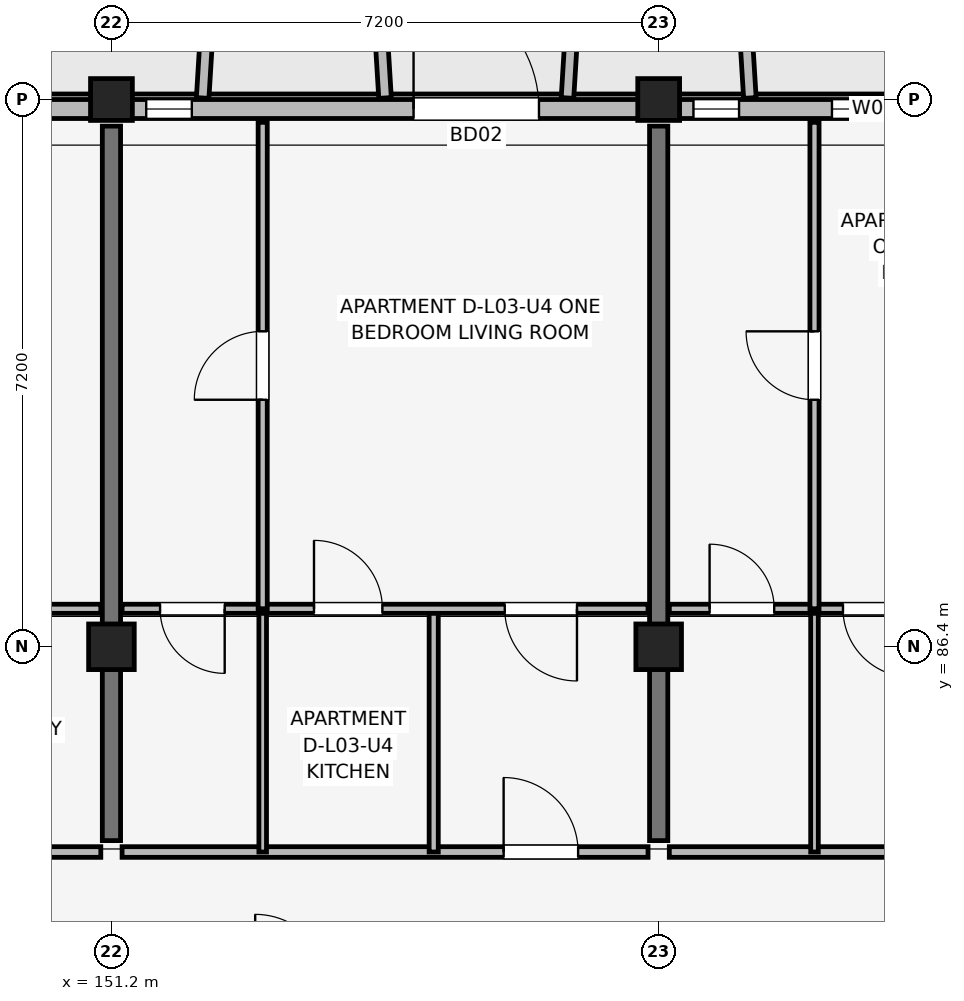
"""IFC4 building model, lengths in metres.
Left out: names, types, materials, properties, quantities, classifications, styles, units other than length and angle.
Written with IfcOpenShell. Run it as: python <this file> out.ifc"""

import sys

from ifc_helpers import new_model, si_unit, direction, frame, frame_2d, origin, origin_2d, place, context, subcontext, project, spatial, rectangle, extrude, element, fill, save


model = new_model("IFC4")
c1 = context("Model", 3, precision=1e-05, world=origin(), true_north=direction((0.0, 1.0)))
c2 = subcontext(c1, "Body", "Model", "MODEL_VIEW")
j1 = project(units=[si_unit("LENGTHUNIT", "METRE"), si_unit("PLANEANGLEUNIT", "RADIAN")], contexts=[c1])
p1 = place(None, origin())
s1 = spatial("IfcSite", under=j1, at=p1, CompositionType="ELEMENT")
p2 = place(p1, origin())
s2 = spatial("IfcBuilding", under=s1, at=p2, CompositionType="ELEMENT")
p3 = place(p2, frame((0.0, 0.0, 11.85)))
s3 = spatial("IfcBuildingStorey", under=s2, at=p3, CompositionType="ELEMENT", Elevation=11.85)
p4 = place(p3, frame((151.2, 86.4, 0.0), z_axis=(0.0, 0.0, 1.0), x_axis=(1.0, 0.0, 0.0)))
e1 = element("IfcColumn", 1, at=p4, inside=s3, PredefinedType="COLUMN", context=c2, shape_type="SweptSolid", body=[
    extrude(rectangle(XDim=0.6, YDim=0.6, at=origin_2d()), origin(), (0.0, 0.0, 1.0), 3.15),
])
p5 = place(p3, frame((151.2, 93.6, 0.0), z_axis=(0.0, 0.0, 1.0), x_axis=(1.0, 0.0, 0.0)))
e2 = element("IfcColumn", 2, at=p5, inside=s3, PredefinedType="COLUMN", context=c2, shape_type="SweptSolid", body=[
    extrude(rectangle(XDim=0.55, YDim=0.55, at=origin_2d()), origin(), (0.0, 0.0, 1.0), 3.15),
])
p6 = place(p3, frame((158.4, 86.4, 0.0), z_axis=(0.0, 0.0, 1.0), x_axis=(1.0, 0.0, 0.0)))
e3 = element("IfcColumn", 3, at=p6, inside=s3, PredefinedType="COLUMN", context=c2, shape_type="SweptSolid", body=[
    extrude(rectangle(XDim=0.6, YDim=0.6, at=origin_2d()), origin(), (0.0, 0.0, 1.0), 3.15),
])
p7 = place(p3, frame((158.4, 93.6, 0.0), z_axis=(0.0, 0.0, 1.0), x_axis=(1.0, 0.0, 0.0)))
e4 = element("IfcColumn", 4, at=p7, inside=s3, PredefinedType="COLUMN", context=c2, shape_type="SweptSolid", body=[
    extrude(rectangle(XDim=0.55, YDim=0.55, at=origin_2d()), origin(), (0.0, 0.0, 1.0), 3.15),
])
for number, where, z_axis, x_axis in (
    (5, (151.2, 83.85, 0.0), (0.0, 0.0, 1.0), (0.0, 1.0, 0.0)),
    (6, (158.4, 83.85, 0.0), (0.0, 0.0, 1.0), (0.0, 1.0, 0.0)),
):
    element("IfcWall", number, at=place(p3, frame(where, z_axis=z_axis, x_axis=x_axis)), inside=s3, PredefinedType="SHEAR", context=c2, shape_type="SweptSolid", body=[
        extrude(rectangle(XDim=9.4, YDim=0.24, at=frame_2d((4.7, 0.0))), origin(), (0.0, 0.0, 1.0), 3.15),
    ])
p8 = place(p3, frame((162.8, 93.475, 0.0), z_axis=(0.0, 0.0, 1.0), x_axis=(-1.0, 0.0, 0.0)))
e7 = element("IfcWall", 7, at=p8, inside=s3, PredefinedType="SOLIDWALL", context=c2, shape_type="SweptSolid", body=[
    extrude(rectangle(XDim=30.4, YDim=0.25, at=frame_2d((15.2, 0.0))), origin(), (0.0, 0.0, 1.0), 2.43),
])
p9 = place(p8, frame((22.1, 0.0, 0.0), z_axis=(0.0, 0.0, 1.0), x_axis=(-1.0, 0.0, 0.0)))
e8 = element("IfcOpeningElement", 8, at=p9, cuts=e7, PredefinedType="OPENING", context=c2, shape_type="SweptSolid", body=[
    extrude(rectangle(XDim=1.8, YDim=2.15, at=frame_2d((0.9, 1.075))), frame((0.0, 0.135, 0.0), z_axis=(0.0, -1.0, 0.0), x_axis=(1.0, 0.0, 0.0)), (0.0, 0.0, 1.0), 0.27),
])
p10 = place(p8, frame((7.625, 0.0, 0.0), z_axis=(0.0, 0.0, 1.0), x_axis=(-1.0, 0.0, 0.0)))
e9 = element("IfcOpeningElement", 9, at=p10, cuts=e7, PredefinedType="OPENING", context=c2, shape_type="SweptSolid", body=[
    extrude(rectangle(XDim=1.65, YDim=2.15, at=frame_2d((0.825, 1.075))), frame((0.0, 0.135, 0.0), z_axis=(0.0, -1.0, 0.0), x_axis=(1.0, 0.0, 0.0)), (0.0, 0.0, 1.0), 0.27),
])
p11 = place(p8, frame((27.97, 0.0, 0.7)))
e10 = element("IfcOpeningElement", 10, at=p11, cuts=e7, PredefinedType="OPENING", context=c2, shape_type="SweptSolid", body=[
    extrude(rectangle(XDim=1.46, YDim=1.55, at=frame_2d((0.73, 0.775))), frame((0.0, 0.135, 0.0), z_axis=(0.0, -1.0, 0.0), x_axis=(1.0, 0.0, 0.0)), (0.0, 0.0, 1.0), 0.27),
])
p12 = place(p8, frame((26.458, 0.0, 0.75)))
e11 = element("IfcOpeningElement", 11, at=p12, cuts=e7, PredefinedType="OPENING", context=c2, shape_type="SweptSolid", body=[
    extrude(rectangle(XDim=0.6, YDim=1.25, at=frame_2d((0.3, 0.625))), frame((0.0, 0.135, 0.0), z_axis=(0.0, -1.0, 0.0), x_axis=(1.0, 0.0, 0.0)), (0.0, 0.0, 1.0), 0.27),
])
p13 = place(p8, frame((24.942, 0.0, 0.75)))
e12 = element("IfcOpeningElement", 12, at=p13, cuts=e7, PredefinedType="OPENING", context=c2, shape_type="SweptSolid", body=[
    extrude(rectangle(XDim=0.6, YDim=1.25, at=frame_2d((0.3, 0.625))), frame((0.0, 0.135, 0.0), z_axis=(0.0, -1.0, 0.0), x_axis=(1.0, 0.0, 0.0)), (0.0, 0.0, 1.0), 0.27),
])
p14 = place(p8, frame((15.54, 0.0, 0.7)))
e13 = element("IfcOpeningElement", 13, at=p14, cuts=e7, PredefinedType="OPENING", context=c2, shape_type="SweptSolid", body=[
    extrude(rectangle(XDim=1.72, YDim=1.6, at=frame_2d((0.86, 0.8))), frame((0.0, 0.135, 0.0), z_axis=(0.0, -1.0, 0.0), x_axis=(1.0, 0.0, 0.0)), (0.0, 0.0, 1.0), 0.27),
])
p15 = place(p8, frame((13.465, 0.0, 0.75)))
e14 = element("IfcOpeningElement", 14, at=p15, cuts=e7, PredefinedType="OPENING", context=c2, shape_type="SweptSolid", body=[
    extrude(rectangle(XDim=0.72, YDim=1.35, at=frame_2d((0.36, 0.675))), frame((0.0, 0.135, 0.0), z_axis=(0.0, -1.0, 0.0), x_axis=(1.0, 0.0, 0.0)), (0.0, 0.0, 1.0), 0.27),
])
p16 = place(p8, frame((10.542, 0.0, 0.75)))
e15 = element("IfcOpeningElement", 15, at=p16, cuts=e7, PredefinedType="OPENING", context=c2, shape_type="SweptSolid", body=[
    extrude(rectangle(XDim=0.6, YDim=1.25, at=frame_2d((0.3, 0.625))), frame((0.0, 0.135, 0.0), z_axis=(0.0, -1.0, 0.0), x_axis=(1.0, 0.0, 0.0)), (0.0, 0.0, 1.0), 0.27),
])
p17 = place(p8, frame((3.343, 0.0, 0.75)))
e16 = element("IfcOpeningElement", 16, at=p17, cuts=e7, PredefinedType="OPENING", context=c2, shape_type="SweptSolid", body=[
    extrude(rectangle(XDim=0.6, YDim=1.25, at=frame_2d((0.3, 0.625))), frame((0.0, 0.135, 0.0), z_axis=(0.0, -1.0, 0.0), x_axis=(1.0, 0.0, 0.0)), (0.0, 0.0, 1.0), 0.27),
])
p18 = place(p8, frame((1.02, 0.0, 0.75)))
e17 = element("IfcOpeningElement", 17, at=p18, cuts=e7, PredefinedType="OPENING", context=c2, shape_type="SweptSolid", body=[
    extrude(rectangle(XDim=1.1, YDim=1.5, at=frame_2d((0.55, 0.75))), frame((0.0, 0.135, 0.0), z_axis=(0.0, -1.0, 0.0), x_axis=(1.0, 0.0, 0.0)), (0.0, 0.0, 1.0), 0.27),
])
for number, where, z_axis, x_axis in (
    (18, (152.4, 93.62, 0.0), (0.0, 0.0, 1.0), (0.061, 0.998, 0.0)),
    (19, (154.8, 93.62, 0.0), (0.0, 0.0, 1.0), (-0.061, 0.998, 0.0)),
    (20, (157.2, 93.62, 0.0), (0.0, 0.0, 1.0), (0.061, 0.998, 0.0)),
):
    element("IfcWall", number, at=place(p3, frame(where, z_axis=z_axis, x_axis=x_axis)), inside=s3, PredefinedType="ELEMENTEDWALL", context=c2, shape_type="SweptSolid", body=[
        extrude(rectangle(XDim=1.964, YDim=0.165, at=frame_2d((0.982, 0.0))), origin(), (0.0, 0.0, 1.0), 2.58),
    ])
p19 = place(p3, frame((159.6, 93.62, 0.0), z_axis=(0.0, 0.0, 1.0), x_axis=(-0.061170732449, 0.998127317276, 0.0)))
e21 = element("IfcWall", 21, at=p19, inside=s3, PredefinedType="ELEMENTEDWALL", context=c2, shape_type="SweptSolid", body=[
    extrude(rectangle(XDim=1.964, YDim=0.165, at=frame_2d((0.982, 0.0))), origin(), (0.0, 0.0, 1.0), 2.95),
])
p20 = place(p3, frame((144.14, 83.7, 0.0), z_axis=(0.0, 0.0, 1.0), x_axis=(1.0, 0.0, 0.0)))
e22 = element("IfcWall", 22, at=p20, inside=s3, PredefinedType="PARTITIONING", context=c2, shape_type="SweptSolid", body=[
    extrude(rectangle(XDim=6.92, YDim=0.14, at=frame_2d((3.46, 0.0))), origin(), (0.0, 0.0, 1.0), 2.38),
])
p21 = place(p20, frame((5.85, 0.0, 0.0), z_axis=(0.0, 0.0, 1.0), x_axis=(-1.0, 0.0, 0.0)))
e23 = element("IfcOpeningElement", 23, at=p21, cuts=e22, PredefinedType="OPENING", context=c2, shape_type="SweptSolid", body=[
    extrude(rectangle(XDim=0.98, YDim=2.1, at=frame_2d((0.49, 1.05))), frame((0.0, 0.08, 0.0), z_axis=(0.0, -1.0, 0.0), x_axis=(1.0, 0.0, 0.0)), (0.0, 0.0, 1.0), 0.16),
])
p22 = place(p3, frame((144.14, 86.9, 0.0), z_axis=(0.0, 0.0, 1.0), x_axis=(1.0, 0.0, 0.0)))
e24 = element("IfcWall", 24, at=p22, inside=s3, PredefinedType="PARTITIONING", context=c2, shape_type="SweptSolid", body=[
    extrude(rectangle(XDim=6.92, YDim=0.12, at=frame_2d((3.46, 0.0))), origin(), (0.0, 0.0, 1.0), 2.38),
])
p23 = place(p22, frame((0.5, 0.0, 0.0)))
e25 = element("IfcOpeningElement", 25, at=p23, cuts=e24, PredefinedType="OPENING", context=c2, shape_type="SweptSolid", body=[
    extrude(rectangle(XDim=0.85, YDim=2.08, at=frame_2d((0.425, 1.04))), frame((0.0, 0.07, 0.0), z_axis=(0.0, -1.0, 0.0), x_axis=(1.0, 0.0, 0.0)), (0.0, 0.0, 1.0), 0.14),
])
p24 = place(p22, frame((3.275, 0.0, 0.0), z_axis=(0.0, 0.0, 1.0), x_axis=(-1.0, 0.0, 0.0)))
e26 = element("IfcOpeningElement", 26, at=p24, cuts=e24, PredefinedType="OPENING", context=c2, shape_type="SweptSolid", body=[
    extrude(rectangle(XDim=0.9, YDim=2.08, at=frame_2d((0.45, 1.04))), frame((0.0, 0.07, 0.0), z_axis=(0.0, -1.0, 0.0), x_axis=(1.0, 0.0, 0.0)), (0.0, 0.0, 1.0), 0.14),
])
p25 = place(p22, frame((4.885, 0.0, 0.0)))
e27 = element("IfcOpeningElement", 27, at=p25, cuts=e24, PredefinedType="OPENING", context=c2, shape_type="SweptSolid", body=[
    extrude(rectangle(XDim=0.95, YDim=2.08, at=frame_2d((0.475, 1.04))), frame((0.0, 0.07, 0.0), z_axis=(0.0, -1.0, 0.0), x_axis=(1.0, 0.0, 0.0)), (0.0, 0.0, 1.0), 0.14),
])
p26 = place(p3, frame((151.34, 83.7, 0.0), z_axis=(0.0, 0.0, 1.0), x_axis=(1.0, 0.0, 0.0)))
e28 = element("IfcWall", 28, at=p26, inside=s3, PredefinedType="PARTITIONING", context=c2, shape_type="SweptSolid", body=[
    extrude(rectangle(XDim=6.92, YDim=0.14, at=frame_2d((3.46, 0.0))), origin(), (0.0, 0.0, 1.0), 2.38),
])
p27 = place(p26, frame((5.02, 0.0, 0.0)))
e29 = element("IfcOpeningElement", 29, at=p27, cuts=e28, PredefinedType="OPENING", context=c2, shape_type="SweptSolid", body=[
    extrude(rectangle(XDim=0.98, YDim=2.1, at=frame_2d((0.49, 1.05))), frame((0.0, 0.08, 0.0), z_axis=(0.0, -1.0, 0.0), x_axis=(1.0, 0.0, 0.0)), (0.0, 0.0, 1.0), 0.16),
])
p28 = place(p3, frame((153.19, 83.7, 0.0), z_axis=(0.0, 0.0, 1.0), x_axis=(0.0, 1.0, 0.0)))
e30 = element("IfcWall", 30, at=p28, inside=s3, PredefinedType="PARTITIONING", context=c2, shape_type="SweptSolid", body=[
    extrude(rectangle(XDim=3.2, YDim=0.1, at=frame_2d((1.6, 0.0))), origin(), (0.0, 0.0, 1.0), 2.375),
])
p29 = place(p3, frame((155.44, 83.7, 0.0), z_axis=(0.0, 0.0, 1.0), x_axis=(0.0, 1.0, 0.0)))
e31 = element("IfcWall", 31, at=p29, inside=s3, PredefinedType="PARTITIONING", context=c2, shape_type="SweptSolid", body=[
    extrude(rectangle(XDim=3.2, YDim=0.12, at=frame_2d((1.6, 0.0))), origin(), (0.0, 0.0, 1.0), 2.375),
])
p30 = place(p3, frame((151.34, 86.9, 0.0), z_axis=(0.0, 0.0, 1.0), x_axis=(1.0, 0.0, 0.0)))
e32 = element("IfcWall", 32, at=p30, inside=s3, PredefinedType="PARTITIONING", context=c2, shape_type="SweptSolid", body=[
    extrude(rectangle(XDim=6.92, YDim=0.12, at=frame_2d((3.46, 0.0))), origin(), (0.0, 0.0, 1.0), 2.38),
])
p31 = place(p30, frame((1.35, 0.0, 0.0), z_axis=(0.0, 0.0, 1.0), x_axis=(-1.0, 0.0, 0.0)))
e33 = element("IfcOpeningElement", 33, at=p31, cuts=e32, PredefinedType="OPENING", context=c2, shape_type="SweptSolid", body=[
    extrude(rectangle(XDim=0.85, YDim=2.08, at=frame_2d((0.425, 1.04))), frame((0.0, 0.07, 0.0), z_axis=(0.0, -1.0, 0.0), x_axis=(1.0, 0.0, 0.0)), (0.0, 0.0, 1.0), 0.14),
])
p32 = place(p30, frame((2.525, 0.0, 0.0)))
e34 = element("IfcOpeningElement", 34, at=p32, cuts=e32, PredefinedType="OPENING", context=c2, shape_type="SweptSolid", body=[
    extrude(rectangle(XDim=0.9, YDim=2.08, at=frame_2d((0.45, 1.04))), frame((0.0, 0.07, 0.0), z_axis=(0.0, -1.0, 0.0), x_axis=(1.0, 0.0, 0.0)), (0.0, 0.0, 1.0), 0.14),
])
p33 = place(p30, frame((5.985, 0.0, 0.0), z_axis=(0.0, 0.0, 1.0), x_axis=(-1.0, 0.0, 0.0)))
e35 = element("IfcOpeningElement", 35, at=p33, cuts=e32, PredefinedType="OPENING", context=c2, shape_type="SweptSolid", body=[
    extrude(rectangle(XDim=0.95, YDim=2.08, at=frame_2d((0.475, 1.04))), frame((0.0, 0.07, 0.0), z_axis=(0.0, -1.0, 0.0), x_axis=(1.0, 0.0, 0.0)), (0.0, 0.0, 1.0), 0.14),
])
p34 = place(p3, frame((153.19, 86.9, 0.0), z_axis=(0.0, 0.0, 1.0), x_axis=(0.0, 1.0, 0.0)))
e36 = element("IfcWall", 36, at=p34, inside=s3, PredefinedType="PARTITIONING", context=c2, shape_type="SweptSolid", body=[
    extrude(rectangle(XDim=6.4, YDim=0.12, at=frame_2d((3.2, 0.0))), origin(), (0.0, 0.0, 1.0), 2.38),
])
p35 = place(p34, frame((2.75, 0.0, 0.0)))
e37 = element("IfcOpeningElement", 37, at=p35, cuts=e36, PredefinedType="OPENING", context=c2, shape_type="SweptSolid", body=[
    extrude(rectangle(XDim=0.9, YDim=2.08, at=frame_2d((0.45, 1.04))), frame((0.0, 0.07, 0.0), z_axis=(0.0, -1.0, 0.0), x_axis=(1.0, 0.0, 0.0)), (0.0, 0.0, 1.0), 0.14),
])
p36 = place(p3, frame((158.54, 83.7, 0.0), z_axis=(0.0, 0.0, 1.0), x_axis=(1.0, 0.0, 0.0)))
e38 = element("IfcWall", 38, at=p36, inside=s3, PredefinedType="PARTITIONING", context=c2, shape_type="SweptSolid", body=[
    extrude(rectangle(XDim=6.92, YDim=0.14, at=frame_2d((3.46, 0.0))), origin(), (0.0, 0.0, 1.0), 2.38),
])
p37 = place(p36, frame((4.875, 0.0, 0.0), z_axis=(0.0, 0.0, 1.0), x_axis=(-1.0, 0.0, 0.0)))
e39 = element("IfcOpeningElement", 39, at=p37, cuts=e38, PredefinedType="OPENING", context=c2, shape_type="SweptSolid", body=[
    extrude(rectangle(XDim=0.98, YDim=2.1, at=frame_2d((0.49, 1.05))), frame((0.0, 0.08, 0.0), z_axis=(0.0, -1.0, 0.0), x_axis=(1.0, 0.0, 0.0)), (0.0, 0.0, 1.0), 0.16),
])
p38 = place(p3, frame((160.45, 83.7, 0.0), z_axis=(0.0, 0.0, 1.0), x_axis=(0.0, 1.0, 0.0)))
e40 = element("IfcWall", 40, at=p38, inside=s3, PredefinedType="PARTITIONING", context=c2, shape_type="SweptSolid", body=[
    extrude(rectangle(XDim=3.2, YDim=0.1, at=frame_2d((1.6, 0.0))), origin(), (0.0, 0.0, 1.0), 2.375),
])
p39 = place(p3, frame((158.54, 86.9, 0.0), z_axis=(0.0, 0.0, 1.0), x_axis=(1.0, 0.0, 0.0)))
e41 = element("IfcWall", 41, at=p39, inside=s3, PredefinedType="PARTITIONING", context=c2, shape_type="SweptSolid", body=[
    extrude(rectangle(XDim=6.92, YDim=0.12, at=frame_2d((3.46, 0.0))), origin(), (0.0, 0.0, 1.0), 2.38),
])
p40 = place(p39, frame((0.53, 0.0, 0.0)))
e42 = element("IfcOpeningElement", 42, at=p40, cuts=e41, PredefinedType="OPENING", context=c2, shape_type="SweptSolid", body=[
    extrude(rectangle(XDim=0.85, YDim=2.08, at=frame_2d((0.425, 1.04))), frame((0.0, 0.07, 0.0), z_axis=(0.0, -1.0, 0.0), x_axis=(1.0, 0.0, 0.0)), (0.0, 0.0, 1.0), 0.14),
])
p41 = place(p39, frame((3.185, 0.0, 0.0), z_axis=(0.0, 0.0, 1.0), x_axis=(-1.0, 0.0, 0.0)))
e43 = element("IfcOpeningElement", 43, at=p41, cuts=e41, PredefinedType="OPENING", context=c2, shape_type="SweptSolid", body=[
    extrude(rectangle(XDim=0.9, YDim=2.08, at=frame_2d((0.45, 1.04))), frame((0.0, 0.07, 0.0), z_axis=(0.0, -1.0, 0.0), x_axis=(1.0, 0.0, 0.0)), (0.0, 0.0, 1.0), 0.14),
])
p42 = place(p39, frame((3.91, 0.0, 0.0)))
e44 = element("IfcOpeningElement", 44, at=p42, cuts=e41, PredefinedType="OPENING", context=c2, shape_type="SweptSolid", body=[
    extrude(rectangle(XDim=0.95, YDim=2.08, at=frame_2d((0.475, 1.04))), frame((0.0, 0.07, 0.0), z_axis=(0.0, -1.0, 0.0), x_axis=(1.0, 0.0, 0.0)), (0.0, 0.0, 1.0), 0.14),
])
p43 = place(p3, frame((160.45, 86.9, 0.0), z_axis=(0.0, 0.0, 1.0), x_axis=(0.0, 1.0, 0.0)))
e45 = element("IfcWall", 45, at=p43, inside=s3, PredefinedType="PARTITIONING", context=c2, shape_type="SweptSolid", body=[
    extrude(rectangle(XDim=6.4, YDim=0.12, at=frame_2d((3.2, 0.0))), origin(), (0.0, 0.0, 1.0), 2.38),
])
p44 = place(p43, frame((2.75, 0.0, 0.0)))
e46 = element("IfcOpeningElement", 46, at=p44, cuts=e45, PredefinedType="OPENING", context=c2, shape_type="SweptSolid", body=[
    extrude(rectangle(XDim=0.9, YDim=2.08, at=frame_2d((0.45, 1.04))), frame((0.0, 0.07, 0.0), z_axis=(0.0, -1.0, 0.0), x_axis=(1.0, 0.0, 0.0)), (0.0, 0.0, 1.0), 0.14),
])
p45 = place(p10, origin())
e47 = element("IfcDoor", 47, at=p45, inside=s3, OperationType="SINGLE_SWING_RIGHT", PredefinedType="DOOR", context=c2, shape_type="SweptSolid", body=[
    extrude(rectangle(XDim=1.65, YDim=2.15, at=frame_2d((0.825, 1.075))), frame((0.0, 0.025, 0.0), z_axis=(0.0, -1.0, 0.0), x_axis=(1.0, 0.0, 0.0)), (0.0, 0.0, 1.0), 0.05),
])
fill(e9, e47)
p46 = place(p16, origin())
e48 = element("IfcWindow", 48, at=p46, inside=s3, PartitioningType="SINGLE_PANEL", PredefinedType="WINDOW", context=c2, shape_type="SweptSolid", body=[
    extrude(rectangle(XDim=0.6, YDim=1.25, at=frame_2d((0.3, 0.625))), frame((0.0, 0.03, 0.0), z_axis=(0.0, -1.0, 0.0), x_axis=(1.0, 0.0, 0.0)), (0.0, 0.0, 1.0), 0.06),
])
fill(e15, e48)
p47 = place(p17, origin())
e49 = element("IfcWindow", 49, at=p47, inside=s3, PartitioningType="SINGLE_PANEL", PredefinedType="WINDOW", context=c2, shape_type="SweptSolid", body=[
    extrude(rectangle(XDim=0.6, YDim=1.25, at=frame_2d((0.3, 0.625))), frame((0.0, 0.03, 0.0), z_axis=(0.0, -1.0, 0.0), x_axis=(1.0, 0.0, 0.0)), (0.0, 0.0, 1.0), 0.06),
])
fill(e16, e49)
p48 = place(p18, origin())
e50 = element("IfcWindow", 50, at=p48, inside=s3, PartitioningType="SINGLE_PANEL", PredefinedType="WINDOW", context=c2, shape_type="SweptSolid", body=[
    extrude(rectangle(XDim=1.1, YDim=1.5, at=frame_2d((0.55, 0.75))), frame((0.0, 0.03, 0.0), z_axis=(0.0, -1.0, 0.0), x_axis=(1.0, 0.0, 0.0)), (0.0, 0.0, 1.0), 0.06),
])
fill(e17, e50)
p49 = place(p27, origin())
e51 = element("IfcDoor", 51, at=p49, inside=s3, OperationType="SINGLE_SWING_LEFT", PredefinedType="DOOR", context=c2, shape_type="SweptSolid", body=[
    extrude(rectangle(XDim=0.98, YDim=2.1, at=frame_2d((0.49, 1.05))), frame((0.0, 0.025, 0.0), z_axis=(0.0, -1.0, 0.0), x_axis=(1.0, 0.0, 0.0)), (0.0, 0.0, 1.0), 0.05),
])
fill(e29, e51)
p50 = place(p31, origin())
e52 = element("IfcDoor", 52, at=p50, inside=s3, OperationType="SINGLE_SWING_RIGHT", PredefinedType="DOOR", context=c2, shape_type="SweptSolid", body=[
    extrude(rectangle(XDim=0.85, YDim=2.08, at=frame_2d((0.425, 1.04))), frame((0.0, 0.025, 0.0), z_axis=(0.0, -1.0, 0.0), x_axis=(1.0, 0.0, 0.0)), (0.0, 0.0, 1.0), 0.05),
])
fill(e33, e52)
p51 = place(p32, origin())
e53 = element("IfcDoor", 53, at=p51, inside=s3, OperationType="SINGLE_SWING_LEFT", PredefinedType="DOOR", context=c2, shape_type="SweptSolid", body=[
    extrude(rectangle(XDim=0.9, YDim=2.08, at=frame_2d((0.45, 1.04))), frame((0.0, 0.025, 0.0), z_axis=(0.0, -1.0, 0.0), x_axis=(1.0, 0.0, 0.0)), (0.0, 0.0, 1.0), 0.05),
])
fill(e34, e53)
p52 = place(p33, origin())
e54 = element("IfcDoor", 54, at=p52, inside=s3, OperationType="SINGLE_SWING_RIGHT", PredefinedType="DOOR", context=c2, shape_type="SweptSolid", body=[
    extrude(rectangle(XDim=0.95, YDim=2.08, at=frame_2d((0.475, 1.04))), frame((0.0, 0.025, 0.0), z_axis=(0.0, -1.0, 0.0), x_axis=(1.0, 0.0, 0.0)), (0.0, 0.0, 1.0), 0.05),
])
fill(e35, e54)
p53 = place(p35, origin())
e55 = element("IfcDoor", 55, at=p53, inside=s3, OperationType="SINGLE_SWING_LEFT", PredefinedType="DOOR", context=c2, shape_type="SweptSolid", body=[
    extrude(rectangle(XDim=0.9, YDim=2.08, at=frame_2d((0.45, 1.04))), frame((0.0, 0.025, 0.0), z_axis=(0.0, -1.0, 0.0), x_axis=(1.0, 0.0, 0.0)), (0.0, 0.0, 1.0), 0.05),
])
fill(e37, e55)
p54 = place(p40, origin())
e56 = element("IfcDoor", 56, at=p54, inside=s3, OperationType="SINGLE_SWING_LEFT", PredefinedType="DOOR", context=c2, shape_type="SweptSolid", body=[
    extrude(rectangle(XDim=0.85, YDim=2.08, at=frame_2d((0.425, 1.04))), frame((0.0, 0.025, 0.0), z_axis=(0.0, -1.0, 0.0), x_axis=(1.0, 0.0, 0.0)), (0.0, 0.0, 1.0), 0.05),
])
fill(e42, e56)
p55 = place(p41, origin())
e57 = element("IfcDoor", 57, at=p55, inside=s3, OperationType="SINGLE_SWING_RIGHT", PredefinedType="DOOR", context=c2, shape_type="SweptSolid", body=[
    extrude(rectangle(XDim=0.9, YDim=2.08, at=frame_2d((0.45, 1.04))), frame((0.0, 0.025, 0.0), z_axis=(0.0, -1.0, 0.0), x_axis=(1.0, 0.0, 0.0)), (0.0, 0.0, 1.0), 0.05),
])
fill(e43, e57)
p56 = place(p44, origin())
e58 = element("IfcDoor", 58, at=p56, inside=s3, OperationType="SINGLE_SWING_RIGHT", PredefinedType="DOOR", context=c2, shape_type="SweptSolid", body=[
    extrude(rectangle(XDim=0.9, YDim=2.08, at=frame_2d((0.45, 1.04))), frame((0.0, 0.025, 0.0), z_axis=(0.0, -1.0, 0.0), x_axis=(1.0, 0.0, 0.0)), (0.0, 0.0, 1.0), 0.05),
])
fill(e46, e58)
save(model, sys.argv[1])
